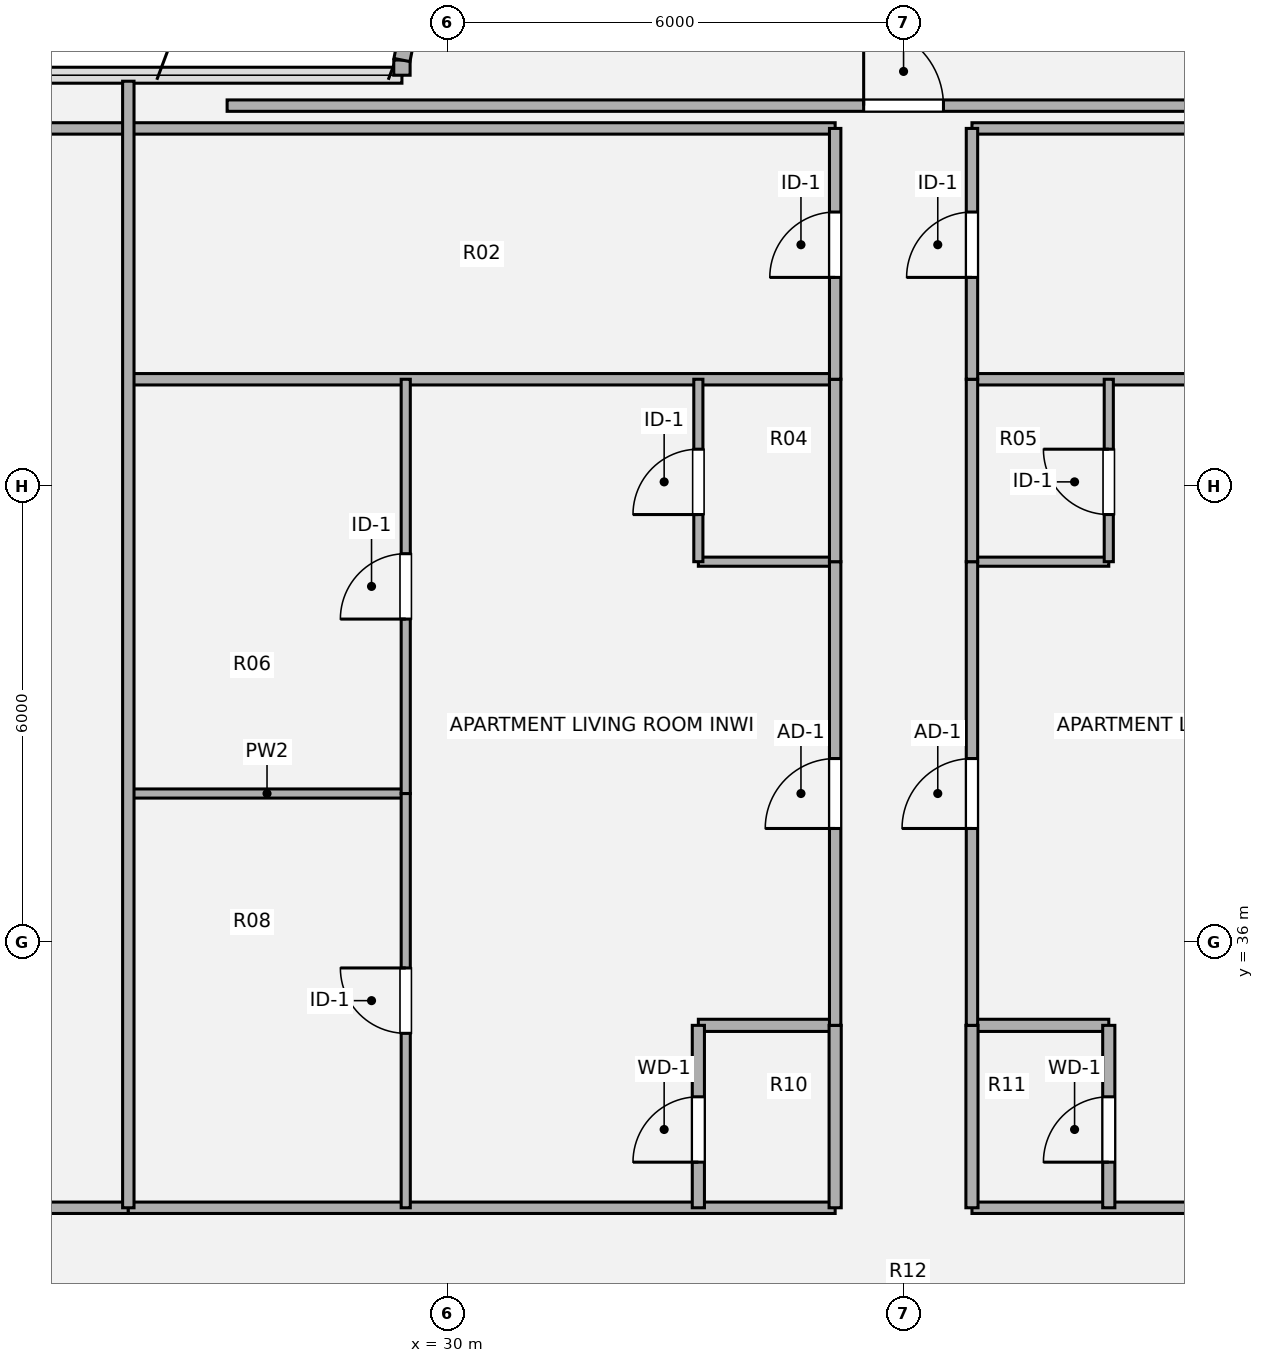
"""IFC4 building model, lengths in metres.
Left out: names, types, materials, properties, quantities, classifications, styles, units other than length and angle.
Written with IfcOpenShell. Run it as: python <this file> out.ifc"""

import sys

from ifc_helpers import new_model, si_unit, direction, frame, frame_2d, origin, origin_2d, place, context, subcontext, project, spatial, rectangle, extrude, source, transform, mapped, element, fill, save


model = new_model("IFC4")
c1 = context("Model", 3, precision=1e-05, world=origin(), true_north=direction((0.0, 1.0)))
c2 = subcontext(c1, "Body", "Model", "MODEL_VIEW")
j1 = project(units=[si_unit("LENGTHUNIT", "METRE"), si_unit("PLANEANGLEUNIT", "RADIAN")], contexts=[c1])
p1 = place(None, origin())
s1 = spatial("IfcSite", under=j1, at=p1, CompositionType="ELEMENT")
p2 = place(p1, origin())
s2 = spatial("IfcBuilding", under=s1, at=p2, CompositionType="ELEMENT")
p3 = place(p2, frame((0.0, 0.0, 142.74)))
s3 = spatial("IfcBuildingStorey", under=s2, at=p3, CompositionType="ELEMENT", Elevation=142.74)
p4 = place(p3, frame((29.4, 47.4, 0.0), z_axis=(0.0, 0.0, 1.0), x_axis=(0.0, 1.0, 0.0)))
e1 = element("IfcWall", 1, at=p4, inside=s3, PredefinedType="SOLIDWALL", context=c2, shape_type="SweptSolid", body=[
    extrude(rectangle(XDim=0.2, YDim=0.215, at=frame_2d((0.1, 0.0))), origin(), (0.0, 0.0, 1.0), 3.372),
])
p5 = place(p3, frame((29.4, 47.6, 0.0), z_axis=(0.0, 0.0, 1.0), x_axis=(0.195127417394, 0.980777900945, 0.0)))
e2 = element("IfcWall", 2, at=p5, inside=s3, PredefinedType="SOLIDWALL", context=c2, shape_type="SweptSolid", body=[
    extrude(rectangle(XDim=1.092, YDim=0.215, at=frame_2d((0.546, 0.0))), origin(), (0.0, 0.0, 1.0), 3.372),
])
p6 = place(p3, frame((13.98, 32.5, 0.0), z_axis=(0.0, 0.0, 1.0), x_axis=(1.0, 0.0, 0.0)))
e3 = element("IfcWall", 3, at=p6, inside=s3, PredefinedType="PARTITIONING", context=c2, shape_type="SweptSolid", body=[
    extrude(rectangle(XDim=11.82, YDim=0.15, at=frame_2d((5.91, 0.0))), origin(), (0.0, 0.0, 1.0), 2.824),
])
p7 = place(p6, frame((6.695, 0.0, 0.0)))
e4 = element("IfcOpeningElement", 4, at=p7, cuts=e3, PredefinedType="OPENING", context=c2, shape_type="SweptSolid", body=[
    extrude(rectangle(XDim=1.05, YDim=2.1, at=origin_2d()), frame((0.525, 0.085, 1.05), z_axis=(0.0, -1.0, 0.0), x_axis=(1.0, 0.0, 0.0)), (0.0, 0.0, 1.0), 0.17),
])
for number, where, z_axis, x_axis in (
    (5, (25.8, 32.5, 0.0), (0.0, 0.0, 1.0), (1.0, 0.0, 0.0)),
    (6, (36.9, 32.5, 0.0), (0.0, 0.0, 1.0), (1.0, 0.0, 0.0)),
):
    element("IfcWall", number, at=place(p3, frame(where, z_axis=z_axis, x_axis=x_axis)), inside=s3, PredefinedType="PARTITIONING", context=c2, shape_type="SweptSolid", body=[
        extrude(rectangle(XDim=9.3, YDim=0.15, at=frame_2d((4.65, 0.0))), origin(), (0.0, 0.0, 1.0), 2.824),
    ])
for number, where, z_axis, x_axis in (
    (7, (33.3, 34.9, 0.0), (0.0, 0.0, 1.0), (1.0, 0.0, 0.0)),
    (8, (36.9, 34.9, 0.0), (0.0, 0.0, 1.0), (1.0, 0.0, 0.0)),
):
    element("IfcWall", number, at=place(p3, frame(where, z_axis=z_axis, x_axis=x_axis)), inside=s3, PredefinedType="PLUMBINGWALL", context=c2, shape_type="SweptSolid", body=[
        extrude(rectangle(XDim=1.8, YDim=0.16, at=frame_2d((0.9, 0.0))), origin(), (0.0, 0.0, 1.0), 3.101),
    ])
p8 = place(p3, frame((25.8, 37.95, 0.0), z_axis=(0.0, 0.0, 1.0), x_axis=(1.0, 0.0, 0.0)))
e9 = element("IfcWall", 9, at=p8, inside=s3, PredefinedType="PARTITIONING", context=c2, shape_type="SweptSolid", body=[
    extrude(rectangle(XDim=3.65, YDim=0.12, at=frame_2d((1.825, 0.0))), origin(), (0.0, 0.0, 1.0), 3.342),
])
for number, where, z_axis, x_axis in (
    (10, (33.3, 41.0, 0.0), (0.0, 0.0, 1.0), (1.0, 0.0, 0.0)),
    (11, (36.9, 41.0, 0.0), (0.0, 0.0, 1.0), (1.0, 0.0, 0.0)),
):
    element("IfcWall", number, at=place(p3, frame(where, z_axis=z_axis, x_axis=x_axis)), inside=s3, PredefinedType="PARTITIONING", context=c2, shape_type="SweptSolid", body=[
        extrude(rectangle(XDim=1.8, YDim=0.12, at=frame_2d((0.9, 0.0))), origin(), (0.0, 0.0, 1.0), 3.101),
    ])
for number, where, z_axis, x_axis in (
    (12, (25.8, 43.4, 0.0), (0.0, 0.0, 1.0), (1.0, 0.0, 0.0)),
    (13, (36.9, 43.4, 0.0), (0.0, 0.0, 1.0), (1.0, 0.0, 0.0)),
):
    element("IfcWall", number, at=place(p3, frame(where, z_axis=z_axis, x_axis=x_axis)), inside=s3, PredefinedType="PARTITIONING", context=c2, shape_type="SweptSolid", body=[
        extrude(rectangle(XDim=9.3, YDim=0.15, at=frame_2d((4.65, 0.0))), origin(), (0.0, 0.0, 1.0), 3.15),
    ])
for number, where, z_axis, x_axis in (
    (14, (23.3, 46.7, 0.0), (0.0, 0.0, 1.0), (1.0, 0.0, 0.0)),
    (15, (36.9, 46.7, 0.0), (0.0, 0.0, 1.0), (1.0, 0.0, 0.0)),
):
    element("IfcWall", number, at=place(p3, frame(where, z_axis=z_axis, x_axis=x_axis)), inside=s3, PredefinedType="PARTITIONING", context=c2, shape_type="SweptSolid", body=[
        extrude(rectangle(XDim=11.8, YDim=0.15, at=frame_2d((5.9, 0.0))), origin(), (0.0, 0.0, 1.0), 3.15),
    ])
p9 = place(p3, frame((27.1, 47.0, 0.0), z_axis=(0.0, 0.0, 1.0), x_axis=(1.0, 0.0, 0.0)))
e16 = element("IfcWall", 16, at=p9, inside=s3, PredefinedType="PARTITIONING", context=c2, shape_type="SweptSolid", body=[
    extrude(rectangle(XDim=17.8, YDim=0.15, at=frame_2d((8.9, 0.0))), origin(), (0.0, 0.0, 1.0), 3.15),
])
p10 = place(p9, frame((8.375, 0.0, 0.0)))
e17 = element("IfcOpeningElement", 17, at=p10, cuts=e16, PredefinedType="OPENING", context=c2, shape_type="SweptSolid", body=[
    extrude(rectangle(XDim=1.05, YDim=2.1, at=origin_2d()), frame((0.525, 0.085, 1.05), z_axis=(0.0, -1.0, 0.0), x_axis=(1.0, 0.0, 0.0)), (0.0, 0.0, 1.0), 0.17),
])
p11 = place(p3, frame((25.8, 32.5, 0.0), z_axis=(0.0, 0.0, 1.0), x_axis=(0.0, 1.0, 0.0)))
e18 = element("IfcWall", 18, at=p11, inside=s3, PredefinedType="PARTITIONING", context=c2, shape_type="SweptSolid", body=[
    extrude(rectangle(XDim=14.821, YDim=0.15, at=frame_2d((7.411, 0.0))), origin(), (0.0, 0.0, 1.0), 3.342),
])
p12 = place(p3, frame((29.45, 32.5, 0.0), z_axis=(0.0, 0.0, 1.0), x_axis=(0.0, 1.0, 0.0)))
e19 = element("IfcWall", 19, at=p12, inside=s3, PredefinedType="PARTITIONING", context=c2, shape_type="SweptSolid", body=[
    extrude(rectangle(XDim=5.45, YDim=0.12, at=frame_2d((2.725, 0.0))), origin(), (0.0, 0.0, 1.0), 3.342),
])
p13 = place(p12, frame((2.295, 0.0, 0.0)))
e20 = element("IfcOpeningElement", 20, at=p13, cuts=e19, PredefinedType="OPENING", context=c2, shape_type="SweptSolid", body=[
    extrude(rectangle(XDim=0.86, YDim=2.1, at=origin_2d()), frame((0.43, 0.07, 1.05), z_axis=(0.0, -1.0, 0.0), x_axis=(1.0, 0.0, 0.0)), (0.0, 0.0, 1.0), 0.14),
])
p14 = place(p3, frame((29.45, 37.95, 0.0), z_axis=(0.0, 0.0, 1.0), x_axis=(0.0, 1.0, 0.0)))
e21 = element("IfcWall", 21, at=p14, inside=s3, PredefinedType="PARTITIONING", context=c2, shape_type="SweptSolid", body=[
    extrude(rectangle(XDim=5.45, YDim=0.12, at=frame_2d((2.725, 0.0))), origin(), (0.0, 0.0, 1.0), 3.342),
])
p15 = place(p14, frame((2.295, 0.0, 0.0)))
e22 = element("IfcOpeningElement", 22, at=p15, cuts=e21, PredefinedType="OPENING", context=c2, shape_type="SweptSolid", body=[
    extrude(rectangle(XDim=0.86, YDim=2.1, at=origin_2d()), frame((0.43, 0.07, 1.05), z_axis=(0.0, -1.0, 0.0), x_axis=(1.0, 0.0, 0.0)), (0.0, 0.0, 1.0), 0.14),
])
p16 = place(p3, frame((33.3, 32.5, 0.0), z_axis=(0.0, 0.0, 1.0), x_axis=(0.0, 1.0, 0.0)))
e23 = element("IfcWall", 23, at=p16, inside=s3, PredefinedType="PLUMBINGWALL", context=c2, shape_type="SweptSolid", body=[
    extrude(rectangle(XDim=2.4, YDim=0.16, at=frame_2d((1.2, 0.0))), origin(), (0.0, 0.0, 1.0), 3.342),
])
p17 = place(p16, frame((0.6, 0.0, 0.0)))
e24 = element("IfcOpeningElement", 24, at=p17, cuts=e23, PredefinedType="OPENING", context=c2, shape_type="SweptSolid", body=[
    extrude(rectangle(XDim=0.86, YDim=2.1, at=origin_2d()), frame((0.43, 0.09, 1.05), z_axis=(0.0, -1.0, 0.0), x_axis=(1.0, 0.0, 0.0)), (0.0, 0.0, 1.0), 0.18),
])
p18 = place(p3, frame((33.3, 41.0, 0.0), z_axis=(0.0, 0.0, 1.0), x_axis=(0.0, 1.0, 0.0)))
e25 = element("IfcWall", 25, at=p18, inside=s3, PredefinedType="PARTITIONING", context=c2, shape_type="SweptSolid", body=[
    extrude(rectangle(XDim=2.4, YDim=0.12, at=frame_2d((1.2, 0.0))), origin(), (0.0, 0.0, 1.0), 3.342),
])
p19 = place(p18, frame((0.62, 0.0, 0.0)))
e26 = element("IfcOpeningElement", 26, at=p19, cuts=e25, PredefinedType="OPENING", context=c2, shape_type="SweptSolid", body=[
    extrude(rectangle(XDim=0.86, YDim=2.1, at=origin_2d()), frame((0.43, 0.07, 1.05), z_axis=(0.0, -1.0, 0.0), x_axis=(1.0, 0.0, 0.0)), (0.0, 0.0, 1.0), 0.14),
])
p20 = place(p3, frame((35.1, 32.5, 0.0), z_axis=(0.0, 0.0, 1.0), x_axis=(0.0, 1.0, 0.0)))
e27 = element("IfcWall", 27, at=p20, inside=s3, PredefinedType="PLUMBINGWALL", context=c2, shape_type="SweptSolid", body=[
    extrude(rectangle(XDim=2.4, YDim=0.16, at=frame_2d((1.2, 0.0))), origin(), (0.0, 0.0, 1.0), 3.342),
])
p21 = place(p3, frame((35.1, 34.9, 0.0), z_axis=(0.0, 0.0, 1.0), x_axis=(0.0, 1.0, 0.0)))
e28 = element("IfcWall", 28, at=p21, inside=s3, PredefinedType="PARTITIONING", context=c2, shape_type="SweptSolid", body=[
    extrude(rectangle(XDim=6.1, YDim=0.15, at=frame_2d((3.05, 0.0))), origin(), (0.0, 0.0, 1.0), 3.342),
])
p22 = place(p21, frame((2.59, 0.0, 0.0)))
e29 = element("IfcOpeningElement", 29, at=p22, cuts=e28, PredefinedType="OPENING", context=c2, shape_type="SweptSolid", body=[
    extrude(rectangle(XDim=0.92, YDim=2.1, at=origin_2d()), frame((0.46, 0.085, 1.05), z_axis=(0.0, -1.0, 0.0), x_axis=(1.0, 0.0, 0.0)), (0.0, 0.0, 1.0), 0.17),
])
p23 = place(p3, frame((35.1, 41.0, 0.0), z_axis=(0.0, 0.0, 1.0), x_axis=(0.0, 1.0, 0.0)))
e30 = element("IfcWall", 30, at=p23, inside=s3, PredefinedType="PARTITIONING", context=c2, shape_type="SweptSolid", body=[
    extrude(rectangle(XDim=2.4, YDim=0.15, at=frame_2d((1.2, 0.0))), origin(), (0.0, 0.0, 1.0), 3.342),
])
p24 = place(p3, frame((35.1, 43.4, 0.0), z_axis=(0.0, 0.0, 1.0), x_axis=(0.0, 1.0, 0.0)))
e31 = element("IfcWall", 31, at=p24, inside=s3, PredefinedType="PARTITIONING", context=c2, shape_type="SweptSolid", body=[
    extrude(rectangle(XDim=3.3, YDim=0.15, at=frame_2d((1.65, 0.0))), origin(), (0.0, 0.0, 1.0), 3.342),
])
p25 = place(p24, frame((1.34, 0.0, 0.0)))
e32 = element("IfcOpeningElement", 32, at=p25, cuts=e31, PredefinedType="OPENING", context=c2, shape_type="SweptSolid", body=[
    extrude(rectangle(XDim=0.86, YDim=2.1, at=origin_2d()), frame((0.43, 0.085, 1.05), z_axis=(0.0, -1.0, 0.0), x_axis=(1.0, 0.0, 0.0)), (0.0, 0.0, 1.0), 0.17),
])
p26 = place(p3, frame((36.9, 32.5, 0.0), z_axis=(0.0, 0.0, 1.0), x_axis=(0.0, 1.0, 0.0)))
e33 = element("IfcWall", 33, at=p26, inside=s3, PredefinedType="PLUMBINGWALL", context=c2, shape_type="SweptSolid", body=[
    extrude(rectangle(XDim=2.4, YDim=0.16, at=frame_2d((1.2, 0.0))), origin(), (0.0, 0.0, 1.0), 3.342),
])
p27 = place(p3, frame((36.9, 34.9, 0.0), z_axis=(0.0, 0.0, 1.0), x_axis=(0.0, 1.0, 0.0)))
e34 = element("IfcWall", 34, at=p27, inside=s3, PredefinedType="PARTITIONING", context=c2, shape_type="SweptSolid", body=[
    extrude(rectangle(XDim=6.1, YDim=0.15, at=frame_2d((3.05, 0.0))), origin(), (0.0, 0.0, 1.0), 3.342),
])
p28 = place(p27, frame((2.59, 0.0, 0.0)))
e35 = element("IfcOpeningElement", 35, at=p28, cuts=e34, PredefinedType="OPENING", context=c2, shape_type="SweptSolid", body=[
    extrude(rectangle(XDim=0.92, YDim=2.1, at=origin_2d()), frame((0.46, 0.085, 1.05), z_axis=(0.0, -1.0, 0.0), x_axis=(1.0, 0.0, 0.0)), (0.0, 0.0, 1.0), 0.17),
])
p29 = place(p3, frame((36.9, 41.0, 0.0), z_axis=(0.0, 0.0, 1.0), x_axis=(0.0, 1.0, 0.0)))
e36 = element("IfcWall", 36, at=p29, inside=s3, PredefinedType="PARTITIONING", context=c2, shape_type="SweptSolid", body=[
    extrude(rectangle(XDim=2.4, YDim=0.15, at=frame_2d((1.2, 0.0))), origin(), (0.0, 0.0, 1.0), 3.342),
])
p30 = place(p3, frame((36.9, 43.4, 0.0), z_axis=(0.0, 0.0, 1.0), x_axis=(0.0, 1.0, 0.0)))
e37 = element("IfcWall", 37, at=p30, inside=s3, PredefinedType="PARTITIONING", context=c2, shape_type="SweptSolid", body=[
    extrude(rectangle(XDim=3.3, YDim=0.15, at=frame_2d((1.65, 0.0))), origin(), (0.0, 0.0, 1.0), 3.342),
])
p31 = place(p30, frame((1.34, 0.0, 0.0)))
e38 = element("IfcOpeningElement", 38, at=p31, cuts=e37, PredefinedType="OPENING", context=c2, shape_type="SweptSolid", body=[
    extrude(rectangle(XDim=0.86, YDim=2.1, at=origin_2d()), frame((0.43, 0.085, 1.05), z_axis=(0.0, -1.0, 0.0), x_axis=(1.0, 0.0, 0.0)), (0.0, 0.0, 1.0), 0.17),
])
p32 = place(p3, frame((38.7, 32.5, 0.0), z_axis=(0.0, 0.0, 1.0), x_axis=(0.0, 1.0, 0.0)))
e39 = element("IfcWall", 39, at=p32, inside=s3, PredefinedType="PLUMBINGWALL", context=c2, shape_type="SweptSolid", body=[
    extrude(rectangle(XDim=2.4, YDim=0.16, at=frame_2d((1.2, 0.0))), origin(), (0.0, 0.0, 1.0), 3.342),
])
p33 = place(p32, frame((0.6, 0.0, 0.0)))
e40 = element("IfcOpeningElement", 40, at=p33, cuts=e39, PredefinedType="OPENING", context=c2, shape_type="SweptSolid", body=[
    extrude(rectangle(XDim=0.86, YDim=2.1, at=origin_2d()), frame((0.43, 0.09, 1.05), z_axis=(0.0, -1.0, 0.0), x_axis=(1.0, 0.0, 0.0)), (0.0, 0.0, 1.0), 0.18),
])
p34 = place(p3, frame((38.7, 41.0, 0.0), z_axis=(0.0, 0.0, 1.0), x_axis=(0.0, 1.0, 0.0)))
e41 = element("IfcWall", 41, at=p34, inside=s3, PredefinedType="PARTITIONING", context=c2, shape_type="SweptSolid", body=[
    extrude(rectangle(XDim=2.4, YDim=0.12, at=frame_2d((1.2, 0.0))), origin(), (0.0, 0.0, 1.0), 3.342),
])
p35 = place(p34, frame((0.62, 0.0, 0.0)))
e42 = element("IfcOpeningElement", 42, at=p35, cuts=e41, PredefinedType="OPENING", context=c2, shape_type="SweptSolid", body=[
    extrude(rectangle(XDim=0.86, YDim=2.1, at=origin_2d()), frame((0.43, 0.07, 1.05), z_axis=(0.0, -1.0, 0.0), x_axis=(1.0, 0.0, 0.0)), (0.0, 0.0, 1.0), 0.14),
])
m1 = source(origin(), c2, "Body", "SweptSolid", [
    extrude(rectangle(XDim=1.05, YDim=2.1, at=origin_2d()), frame((0.525, 0.025, 1.05), z_axis=(0.0, -1.0, 0.0), x_axis=(1.0, 0.0, 0.0)), (0.0, 0.0, 1.0), 0.05),
])
p36 = place(p10, origin())
e43 = element("IfcDoor", 43, at=p36, inside=s3, OperationType="SINGLE_SWING_LEFT", PredefinedType="DOOR", context=c2, shape_type="MappedRepresentation", body=[
    mapped(m1, transform((0.0, 0.0, 0.0), x_axis=(1.0, 0.0, 0.0), y_axis=(0.0, 1.0, 0.0), z_axis=(0.0, 0.0, 1.0), scale=1.0)),
])
fill(e17, e43)
m2 = source(origin(), c2, "Body", "SweptSolid", [
    extrude(rectangle(XDim=0.86, YDim=2.1, at=origin_2d()), frame((0.43, 0.025, 1.05), z_axis=(0.0, -1.0, 0.0), x_axis=(1.0, 0.0, 0.0)), (0.0, 0.0, 1.0), 0.05),
])
p37 = place(p13, origin())
e44 = element("IfcDoor", 44, at=p37, inside=s3, OperationType="SINGLE_SWING_RIGHT", PredefinedType="DOOR", context=c2, shape_type="MappedRepresentation", body=[
    mapped(m2, transform((0.0, 0.0, 0.0), x_axis=(1.0, 0.0, 0.0), y_axis=(0.0, 1.0, 0.0), z_axis=(0.0, 0.0, 1.0), scale=1.0)),
])
fill(e20, e44)
p38 = place(p15, origin())
e45 = element("IfcDoor", 45, at=p38, inside=s3, OperationType="SINGLE_SWING_LEFT", PredefinedType="DOOR", context=c2, shape_type="MappedRepresentation", body=[
    mapped(m2, transform((0.0, 0.0, 0.0), x_axis=(1.0, 0.0, 0.0), y_axis=(0.0, 1.0, 0.0), z_axis=(0.0, 0.0, 1.0), scale=1.0)),
])
fill(e22, e45)
m3 = source(origin(), c2, "Body", "SweptSolid", [
    extrude(rectangle(XDim=0.86, YDim=2.1, at=origin_2d()), frame((0.43, 0.025, 1.05), z_axis=(0.0, -1.0, 0.0), x_axis=(1.0, 0.0, 0.0)), (0.0, 0.0, 1.0), 0.05),
])
p39 = place(p17, origin())
e46 = element("IfcDoor", 46, at=p39, inside=s3, OperationType="SINGLE_SWING_LEFT", PredefinedType="DOOR", context=c2, shape_type="MappedRepresentation", body=[
    mapped(m3, transform((0.0, 0.0, 0.0), x_axis=(1.0, 0.0, 0.0), y_axis=(0.0, 1.0, 0.0), z_axis=(0.0, 0.0, 1.0), scale=1.0)),
])
fill(e24, e46)
p40 = place(p19, origin())
e47 = element("IfcDoor", 47, at=p40, inside=s3, OperationType="SINGLE_SWING_LEFT", PredefinedType="DOOR", context=c2, shape_type="MappedRepresentation", body=[
    mapped(m2, transform((0.0, 0.0, 0.0), x_axis=(1.0, 0.0, 0.0), y_axis=(0.0, 1.0, 0.0), z_axis=(0.0, 0.0, 1.0), scale=1.0)),
])
fill(e26, e47)
m4 = source(origin(), c2, "Body", "SweptSolid", [
    extrude(rectangle(XDim=0.92, YDim=2.1, at=origin_2d()), frame((0.46, 0.025, 1.05), z_axis=(0.0, -1.0, 0.0), x_axis=(1.0, 0.0, 0.0)), (0.0, 0.0, 1.0), 0.05),
])
p41 = place(p22, origin())
e48 = element("IfcDoor", 48, at=p41, inside=s3, OperationType="SINGLE_SWING_LEFT", PredefinedType="DOOR", context=c2, shape_type="MappedRepresentation", body=[
    mapped(m4, transform((0.0, 0.0, 0.0), x_axis=(1.0, 0.0, 0.0), y_axis=(0.0, 1.0, 0.0), z_axis=(0.0, 0.0, 1.0), scale=1.0)),
])
fill(e29, e48)
p42 = place(p25, origin())
e49 = element("IfcDoor", 49, at=p42, inside=s3, OperationType="SINGLE_SWING_LEFT", PredefinedType="DOOR", context=c2, shape_type="MappedRepresentation", body=[
    mapped(m2, transform((0.0, 0.0, 0.0), x_axis=(1.0, 0.0, 0.0), y_axis=(0.0, 1.0, 0.0), z_axis=(0.0, 0.0, 1.0), scale=1.0)),
])
fill(e32, e49)
p43 = place(p28, origin())
e50 = element("IfcDoor", 50, at=p43, inside=s3, OperationType="SINGLE_SWING_LEFT", PredefinedType="DOOR", context=c2, shape_type="MappedRepresentation", body=[
    mapped(m4, transform((0.0, 0.0, 0.0), x_axis=(1.0, 0.0, 0.0), y_axis=(0.0, 1.0, 0.0), z_axis=(0.0, 0.0, 1.0), scale=1.0)),
])
fill(e35, e50)
p44 = place(p31, origin())
e51 = element("IfcDoor", 51, at=p44, inside=s3, OperationType="SINGLE_SWING_LEFT", PredefinedType="DOOR", context=c2, shape_type="MappedRepresentation", body=[
    mapped(m2, transform((0.0, 0.0, 0.0), x_axis=(1.0, 0.0, 0.0), y_axis=(0.0, 1.0, 0.0), z_axis=(0.0, 0.0, 1.0), scale=1.0)),
])
fill(e38, e51)
p45 = place(p33, origin())
e52 = element("IfcDoor", 52, at=p45, inside=s3, OperationType="SINGLE_SWING_LEFT", PredefinedType="DOOR", context=c2, shape_type="MappedRepresentation", body=[
    mapped(m3, transform((0.0, 0.0, 0.0), x_axis=(1.0, 0.0, 0.0), y_axis=(0.0, 1.0, 0.0), z_axis=(0.0, 0.0, 1.0), scale=1.0)),
])
fill(e40, e52)
p46 = place(p35, origin())
e53 = element("IfcDoor", 53, at=p46, inside=s3, OperationType="SINGLE_SWING_RIGHT", PredefinedType="DOOR", context=c2, shape_type="MappedRepresentation", body=[
    mapped(m2, transform((0.0, 0.0, 0.0), x_axis=(1.0, 0.0, 0.0), y_axis=(0.0, 1.0, 0.0), z_axis=(0.0, 0.0, 1.0), scale=1.0)),
])
fill(e42, e53)
save(model, sys.argv[1])
